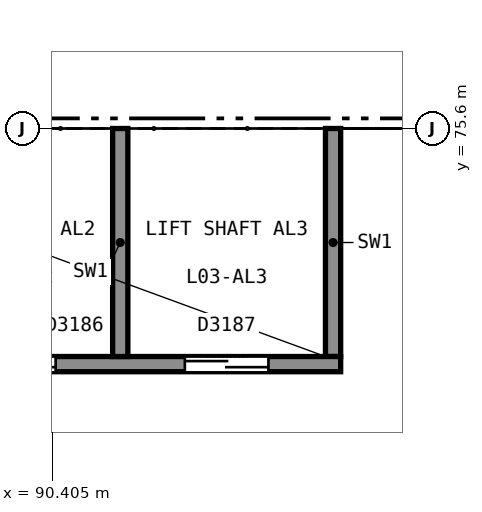
"""IFC4 building model, lengths in metres.
Left out: names, types, materials, properties, quantities, classifications, styles, units other than length and angle.
Written with IfcOpenShell. Run it as: python <this file> out.ifc"""

import sys

from ifc_helpers import new_model, si_unit, direction, frame, frame_2d, origin, place, context, subcontext, project, spatial, rectangle, extrude, element, fill, save


model = new_model("IFC4")
c1 = context("Model", 3, precision=1e-05, world=origin(), true_north=direction((0.0, 1.0)))
c2 = subcontext(c1, "Body", "Model", "MODEL_VIEW")
j1 = project(units=[si_unit("LENGTHUNIT", "METRE"), si_unit("PLANEANGLEUNIT", "RADIAN")], contexts=[c1])
p1 = place(None, origin())
s1 = spatial("IfcSite", under=j1, at=p1, CompositionType="ELEMENT")
p2 = place(p1, origin())
s2 = spatial("IfcBuilding", under=s1, at=p2, CompositionType="ELEMENT")
p3 = place(p2, frame((0.0, 0.0, 20.0)))
s3 = spatial("IfcBuildingStorey", under=s2, at=p3, CompositionType="ELEMENT", Elevation=20.0)
p4 = place(p3, frame((85.6, 72.5, 0.0), z_axis=(0.0, 0.0, 1.0), x_axis=(1.0, 0.0, 0.0)))
e1 = element("IfcWall", 1, at=p4, inside=s3, PredefinedType="SHEAR", context=c2, shape_type="SweptSolid", body=[
    extrude(rectangle(XDim=8.6, YDim=0.2, at=frame_2d((4.3, 0.0))), origin(), (0.0, 0.0, 1.0), 5.0),
])
p5 = place(p4, frame((0.95, 0.0, 0.0)))
e2 = element("IfcOpeningElement", 2, at=p5, cuts=e1, PredefinedType="OPENING", context=c2, shape_type="SweptSolid", body=[
    extrude(rectangle(XDim=1.1, YDim=2.1, at=frame_2d((0.55, 1.05))), frame((0.0, 0.11, 0.0), z_axis=(0.0, -1.0, 0.0), x_axis=(1.0, 0.0, 0.0)), (0.0, 0.0, 1.0), 0.22),
])
p6 = place(p4, frame((3.75, 0.0, 0.0)))
e3 = element("IfcOpeningElement", 3, at=p6, cuts=e1, PredefinedType="OPENING", context=c2, shape_type="SweptSolid", body=[
    extrude(rectangle(XDim=1.1, YDim=2.1, at=frame_2d((0.55, 1.05))), frame((0.0, 0.11, 0.0), z_axis=(0.0, -1.0, 0.0), x_axis=(1.0, 0.0, 0.0)), (0.0, 0.0, 1.0), 0.22),
])
p7 = place(p4, frame((6.55, 0.0, 0.0)))
e4 = element("IfcOpeningElement", 4, at=p7, cuts=e1, PredefinedType="OPENING", context=c2, shape_type="SweptSolid", body=[
    extrude(rectangle(XDim=1.1, YDim=2.1, at=frame_2d((0.55, 1.05))), frame((0.0, 0.11, 0.0), z_axis=(0.0, -1.0, 0.0), x_axis=(1.0, 0.0, 0.0)), (0.0, 0.0, 1.0), 0.22),
])
for number, where, z_axis, x_axis in (
    (5, (94.1, 72.6, 0.0), (0.0, 0.0, 1.0), (0.0, 1.0, 0.0)),
    (6, (91.3, 72.6, 0.0), (0.0, 0.0, 1.0), (0.0, 1.0, 0.0)),
):
    element("IfcWall", number, at=place(p3, frame(where, z_axis=z_axis, x_axis=x_axis)), inside=s3, PredefinedType="SHEAR", context=c2, shape_type="SweptSolid", body=[
        extrude(rectangle(XDim=3.0, YDim=0.2, at=frame_2d((1.5, 0.0))), origin(), (0.0, 0.0, 1.0), 5.0),
    ])
p8 = place(p6, origin())
e7 = element("IfcDoor", 7, at=p8, inside=s3, OperationType="DOUBLE_DOOR_SLIDING", PredefinedType="DOOR", context=c2, shape_type="SweptSolid", body=[
    extrude(rectangle(XDim=1.1, YDim=2.1, at=frame_2d((0.55, 1.05))), frame((0.0, 0.025, 0.0), z_axis=(0.0, -1.0, 0.0), x_axis=(1.0, 0.0, 0.0)), (0.0, 0.0, 1.0), 0.05),
])
fill(e3, e7)
p9 = place(p7, origin())
e8 = element("IfcDoor", 8, at=p9, inside=s3, OperationType="DOUBLE_DOOR_SLIDING", PredefinedType="DOOR", context=c2, shape_type="SweptSolid", body=[
    extrude(rectangle(XDim=1.1, YDim=2.1, at=frame_2d((0.55, 1.05))), frame((0.0, 0.025, 0.0), z_axis=(0.0, -1.0, 0.0), x_axis=(1.0, 0.0, 0.0)), (0.0, 0.0, 1.0), 0.05),
])
fill(e4, e8)
save(model, sys.argv[1])
